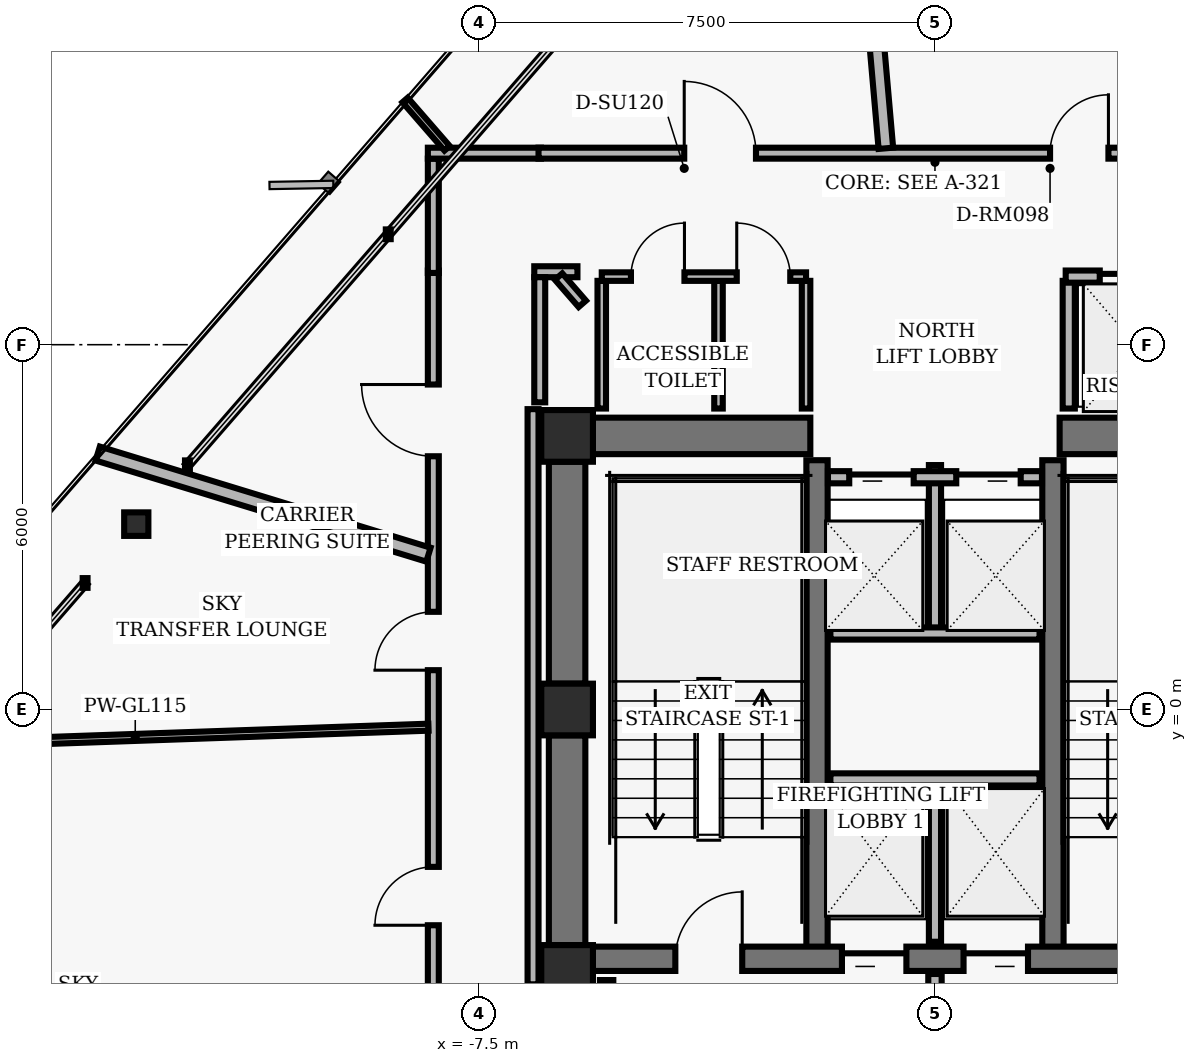
"""IFC4 building model, lengths in metres.
Left out: names, types, materials, properties, quantities, classifications, styles, units other than length and angle.
Written with IfcOpenShell. Run it as: python <this file> out.ifc"""

import sys

from ifc_helpers import new_model, si_unit, direction, frame, frame_2d, origin, origin_2d, place, context, subcontext, project, spatial, rectangle, hollow_rectangle, i_section, extrude, element, fill, save


model = new_model("IFC4")
c1 = context("Model", 3, precision=1e-05, world=origin(), true_north=direction((0.0, 1.0)))
c2 = subcontext(c1, "Body", "Model", "MODEL_VIEW")
j1 = project(units=[si_unit("LENGTHUNIT", "METRE"), si_unit("PLANEANGLEUNIT", "RADIAN")], contexts=[c1])
p1 = place(None, origin())
s1 = spatial("IfcSite", under=j1, at=p1, CompositionType="ELEMENT")
p2 = place(p1, origin())
s2 = spatial("IfcBuilding", under=s1, at=p2, CompositionType="ELEMENT")
p3 = place(p2, frame((0.0, 0.0, 168.48)))
s3 = spatial("IfcBuildingStorey", under=s2, at=p3, CompositionType="ELEMENT", Elevation=168.48)
for number, where, z_axis, x_axis in (
    (1, (-6.05, 4.5, 0.0), (0.0, 0.0, 1.0), (1.0, 0.0, 0.0)),
    (2, (-6.05, 0.0, 0.0), (0.0, 0.0, 1.0), (1.0, 0.0, 0.0)),
    (3, (-6.05, -4.3, 0.0), (0.0, 0.0, 1.0), (1.0, 0.0, 0.0)),
):
    element("IfcColumn", number, at=place(p3, frame(where, z_axis=z_axis, x_axis=x_axis)), inside=s3, PredefinedType="COLUMN", context=c2, shape_type="SweptSolid", body=[
        extrude(hollow_rectangle(XDim=0.85, YDim=0.85, WallThickness=0.055, InnerFilletRadius=0.02, OuterFilletRadius=0.04, at=origin_2d()), origin(), (0.0, 0.0, 1.0), 3.04),
    ])
p4 = place(p3, frame((-6.05, 0.425, 0.0), z_axis=(0.0, 0.0, 1.0), x_axis=(0.0, 1.0, 0.0)))
e4 = element("IfcWall", 4, at=p4, inside=s3, PredefinedType="SHEAR", context=c2, shape_type="SweptSolid", body=[
    extrude(rectangle(XDim=3.65, YDim=0.6, at=frame_2d((1.825, 0.0))), origin(), (0.0, 0.0, 1.0), 2.718),
])
p5 = place(p3, frame((-6.05, -3.875, 0.0), z_axis=(0.0, 0.0, 1.0), x_axis=(0.0, 1.0, 0.0)))
e5 = element("IfcWall", 5, at=p5, inside=s3, PredefinedType="SHEAR", context=c2, shape_type="SweptSolid", body=[
    extrude(rectangle(XDim=3.45, YDim=0.6, at=frame_2d((1.725, 0.0))), origin(), (0.0, 0.0, 1.0), 2.718),
])
for number, where, z_axis, x_axis in (
    (6, (-1.94, -4.1, 0.0), (0.0, 0.0, 1.0), (0.0, 1.0, 0.0)),
    (7, (1.94, -4.1, 0.0), (0.0, 0.0, 1.0), (0.0, 1.0, 0.0)),
):
    element("IfcWall", number, at=place(p3, frame(where, z_axis=z_axis, x_axis=x_axis)), inside=s3, PredefinedType="SHEAR", context=c2, shape_type="SweptSolid", body=[
        extrude(rectangle(XDim=8.2, YDim=0.35, at=frame_2d((4.1, 0.0))), origin(), (0.0, 0.0, 1.0), 2.718),
    ])
p6 = place(p3, frame((-5.625, -4.1, 0.0), z_axis=(0.0, 0.0, 1.0), x_axis=(1.0, 0.0, 0.0)))
e8 = element("IfcWall", 8, at=p6, inside=s3, PredefinedType="SHEAR", context=c2, shape_type="SweptSolid", body=[
    extrude(rectangle(XDim=11.25, YDim=0.4, at=frame_2d((5.625, 0.0))), origin(), (0.0, 0.0, 1.0), 2.718),
])
p7 = place(p6, frame((1.355, 0.0, 0.0)))
e9 = element("IfcOpeningElement", 9, at=p7, cuts=e8, PredefinedType="OPENING", context=c2, shape_type="SweptSolid", body=[
    extrude(rectangle(XDim=1.1, YDim=2.04, at=frame_2d((0.55, 1.02))), frame((0.0, 0.21, 0.0), z_axis=(0.0, -1.0, 0.0), x_axis=(1.0, 0.0, 0.0)), (0.0, 0.0, 1.0), 0.42),
])
p8 = place(p6, frame((8.795, 0.0, 0.0)))
e10 = element("IfcOpeningElement", 10, at=p8, cuts=e8, PredefinedType="OPENING", context=c2, shape_type="SweptSolid", body=[
    extrude(rectangle(XDim=1.1, YDim=2.04, at=frame_2d((0.55, 1.02))), frame((0.0, 0.21, 0.0), z_axis=(0.0, -1.0, 0.0), x_axis=(1.0, 0.0, 0.0)), (0.0, 0.0, 1.0), 0.42),
])
p9 = place(p6, frame((4.095, 0.0, 0.0)))
e11 = element("IfcOpeningElement", 11, at=p9, cuts=e8, PredefinedType="OPENING", context=c2, shape_type="SweptSolid", body=[
    extrude(rectangle(XDim=1.06, YDim=2.04, at=frame_2d((0.53, 1.02))), frame((0.0, 0.21, 0.0), z_axis=(0.0, -1.0, 0.0), x_axis=(1.0, 0.0, 0.0)), (0.0, 0.0, 1.0), 0.42),
])
p10 = place(p6, frame((6.095, 0.0, 0.0)))
e12 = element("IfcOpeningElement", 12, at=p10, cuts=e8, PredefinedType="OPENING", context=c2, shape_type="SweptSolid", body=[
    extrude(rectangle(XDim=1.06, YDim=2.04, at=frame_2d((0.53, 1.02))), frame((0.0, 0.21, 0.0), z_axis=(0.0, -1.0, 0.0), x_axis=(1.0, 0.0, 0.0)), (0.0, 0.0, 1.0), 0.42),
])
for number, where, z_axis, x_axis in (
    (13, (-5.625, 4.5, 0.0), (0.0, 0.0, 1.0), (1.0, 0.0, 0.0)),
    (14, (2.05, 4.5, 0.0), (0.0, 0.0, 1.0), (1.0, 0.0, 0.0)),
):
    element("IfcWall", number, at=place(p3, frame(where, z_axis=z_axis, x_axis=x_axis)), inside=s3, PredefinedType="SHEAR", context=c2, shape_type="SweptSolid", body=[
        extrude(rectangle(XDim=3.575, YDim=0.6, at=frame_2d((1.788, 0.0))), origin(), (0.0, 0.0, 1.0), 2.718),
    ])
p11 = place(p3, frame((-13.135, 3.049, 0.0), z_axis=(0.0, 0.0, 1.0), x_axis=(1.0, 0.0, 0.0)))
e15 = element("IfcColumn", 15, at=p11, inside=s3, PredefinedType="COLUMN", context=c2, shape_type="SweptSolid", body=[
    extrude(i_section(OverallWidth=0.398, OverallDepth=0.387, WebThickness=0.021, FlangeThickness=0.033, FilletRadius=0.018, at=origin_2d()), origin(), (0.0, 0.0, 1.0), 3.04),
])
p12 = place(p3, frame((0.0, -3.82, 0.0), z_axis=(0.0, 0.0, 1.0), x_axis=(0.0, 1.0, 0.0)))
e16 = element("IfcWall", 16, at=p12, inside=s3, PredefinedType="PARTITIONING", context=c2, shape_type="SweptSolid", body=[
    extrude(rectangle(XDim=2.67, YDim=0.2, at=frame_2d((1.335, 0.0))), origin(), (0.0, 0.0, 1.0), 2.693),
])
p13 = place(p3, frame((-1.72, -1.15, 0.0), z_axis=(0.0, 0.0, 1.0), x_axis=(1.0, 0.0, 0.0)))
e17 = element("IfcWall", 17, at=p13, inside=s3, PredefinedType="PARTITIONING", context=c2, shape_type="SweptSolid", body=[
    extrude(rectangle(XDim=3.44, YDim=0.2, at=frame_2d((1.72, 0.0))), origin(), (0.0, 0.0, 1.0), 2.693),
])
p14 = place(p3, frame((-5.4, -7.16, 0.0), z_axis=(0.0, 0.0, 1.0), x_axis=(0.0, 1.0, 0.0)))
e18 = element("IfcWall", 18, at=p14, inside=s3, PredefinedType="PARTITIONING", context=c2, shape_type="SweptSolid", body=[
    extrude(rectangle(XDim=2.71, YDim=0.22, at=frame_2d((1.355, 0.0))), origin(), (0.0, 0.0, 1.0), 2.693),
])
p15 = place(p3, frame((0.0, -7.16, 0.0), z_axis=(0.0, 0.0, 1.0), x_axis=(0.0, 1.0, 0.0)))
e19 = element("IfcWall", 19, at=p15, inside=s3, PredefinedType="PARTITIONING", context=c2, shape_type="SweptSolid", body=[
    extrude(rectangle(XDim=2.81, YDim=0.22, at=frame_2d((1.405, 0.0))), origin(), (0.0, 0.0, 1.0), 2.693),
])
p16 = place(p3, frame((0.0, 1.25, 0.0), z_axis=(0.0, 0.0, 1.0), x_axis=(0.0, 1.0, 0.0)))
e20 = element("IfcWall", 20, at=p16, inside=s3, PredefinedType="PARTITIONING", context=c2, shape_type="SweptSolid", body=[
    extrude(rectangle(XDim=2.77, YDim=0.2, at=frame_2d((1.385, 0.0))), origin(), (0.0, 0.0, 1.0), 2.693),
])
p17 = place(p3, frame((-1.72, 1.25, 0.0), z_axis=(0.0, 0.0, 1.0), x_axis=(1.0, 0.0, 0.0)))
e21 = element("IfcWall", 21, at=p17, inside=s3, PredefinedType="PARTITIONING", context=c2, shape_type="SweptSolid", body=[
    extrude(rectangle(XDim=3.44, YDim=0.2, at=frame_2d((1.72, 0.0))), origin(), (0.0, 0.0, 1.0), 2.693),
])
p18 = place(p3, frame((-1.76, 3.82, 0.0), z_axis=(0.0, 0.0, 1.0), x_axis=(1.0, 0.0, 0.0)))
e22 = element("IfcWall", 22, at=p18, inside=s3, PredefinedType="PARTITIONING", context=c2, shape_type="SweptSolid", body=[
    extrude(rectangle(XDim=3.52, YDim=0.2, at=frame_2d((1.76, 0.0))), origin(), (0.0, 0.0, 1.0), 2.693),
])
p19 = place(p18, frame((0.35, 0.0, 0.0)))
e23 = element("IfcOpeningElement", 23, at=p19, cuts=e22, PredefinedType="OPENING", context=c2, shape_type="SweptSolid", body=[
    extrude(rectangle(XDim=1.06, YDim=2.04, at=frame_2d((0.53, 1.02))), frame((0.0, 0.11, 0.0), z_axis=(0.0, -1.0, 0.0), x_axis=(1.0, 0.0, 0.0)), (0.0, 0.0, 1.0), 0.22),
])
p20 = place(p18, frame((2.11, 0.0, 0.0)))
e24 = element("IfcOpeningElement", 24, at=p20, cuts=e22, PredefinedType="OPENING", context=c2, shape_type="SweptSolid", body=[
    extrude(rectangle(XDim=1.06, YDim=2.04, at=frame_2d((0.53, 1.02))), frame((0.0, 0.11, 0.0), z_axis=(0.0, -1.0, 0.0), x_axis=(1.0, 0.0, 0.0)), (0.0, 0.0, 1.0), 0.22),
])
p21 = place(p3, frame((2.2, 4.95, 0.0), z_axis=(0.0, 0.0, 1.0), x_axis=(0.0, 1.0, 0.0)))
e25 = element("IfcWall", 25, at=p21, inside=s3, PredefinedType="PARTITIONING", context=c2, shape_type="SweptSolid", body=[
    extrude(rectangle(XDim=2.1, YDim=0.2, at=frame_2d((1.05, 0.0))), origin(), (0.0, 0.0, 1.0), 2.693),
])
p22 = place(p3, frame((2.15, 7.12, 0.0), z_axis=(0.0, 0.0, 1.0), x_axis=(1.0, 0.0, 0.0)))
e26 = element("IfcWall", 26, at=p22, inside=s3, PredefinedType="PARTITIONING", context=c2, shape_type="SweptSolid", body=[
    extrude(rectangle(XDim=2.38, YDim=0.2, at=frame_2d((1.19, 0.0))), origin(), (0.0, 0.0, 1.0), 2.693),
])
p23 = place(p22, frame((0.56, 0.0, 0.0)))
e27 = element("IfcOpeningElement", 27, at=p23, cuts=e26, PredefinedType="OPENING", context=c2, shape_type="SweptSolid", body=[
    extrude(rectangle(XDim=1.26, YDim=2.06, at=frame_2d((0.63, 1.03))), frame((0.0, 0.11, 0.0), z_axis=(0.0, -1.0, 0.0), x_axis=(1.0, 0.0, 0.0)), (0.0, 0.0, 1.0), 0.22),
])
for number, where, z_axis, x_axis in (
    (28, (-5.48, 4.95, 0.0), (0.0, 0.0, 1.0), (0.0, 1.0, 0.0)),
    (29, (-3.56, 4.95, 0.0), (0.0, 0.0, 1.0), (0.0, 1.0, 0.0)),
    (30, (-2.12, 4.95, 0.0), (0.0, 0.0, 1.0), (0.0, 1.0, 0.0)),
):
    element("IfcWall", number, at=place(p3, frame(where, z_axis=z_axis, x_axis=x_axis)), inside=s3, PredefinedType="PARTITIONING", context=c2, shape_type="SweptSolid", body=[
        extrude(rectangle(XDim=2.1, YDim=0.14, at=frame_2d((1.05, 0.0))), origin(), (0.0, 0.0, 1.0), 2.693),
    ])
p24 = place(p3, frame((-5.48, 7.12, 0.0), z_axis=(0.0, 0.0, 1.0), x_axis=(1.0, 0.0, 0.0)))
e31 = element("IfcWall", 31, at=p24, inside=s3, PredefinedType="PARTITIONING", context=c2, shape_type="SweptSolid", body=[
    extrude(rectangle(XDim=3.36, YDim=0.14, at=frame_2d((1.68, 0.0))), origin(), (0.0, 0.0, 1.0), 2.693),
])
p25 = place(p24, frame((0.48, 0.0, 0.0)))
e32 = element("IfcOpeningElement", 32, at=p25, cuts=e31, PredefinedType="OPENING", context=c2, shape_type="SweptSolid", body=[
    extrude(rectangle(XDim=0.88, YDim=2.02, at=frame_2d((0.44, 1.01))), frame((0.0, 0.08, 0.0), z_axis=(0.0, -1.0, 0.0), x_axis=(1.0, 0.0, 0.0)), (0.0, 0.0, 1.0), 0.16),
])
p26 = place(p24, frame((2.22, 0.0, 0.0)))
e33 = element("IfcOpeningElement", 33, at=p26, cuts=e31, PredefinedType="OPENING", context=c2, shape_type="SweptSolid", body=[
    extrude(rectangle(XDim=0.88, YDim=2.02, at=frame_2d((0.44, 1.01))), frame((0.0, 0.08, 0.0), z_axis=(0.0, -1.0, 0.0), x_axis=(1.0, 0.0, 0.0)), (0.0, 0.0, 1.0), 0.16),
])
p27 = place(p3, frame((-8.25, -7.22, 0.0), z_axis=(0.0, 0.0, 1.0), x_axis=(0.0, 1.0, 0.0)))
e34 = element("IfcWall", 34, at=p27, inside=s3, PredefinedType="PARTITIONING", context=c2, shape_type="SweptSolid", body=[
    extrude(rectangle(XDim=14.44, YDim=0.18, at=frame_2d((7.22, 0.0))), origin(), (0.0, 0.0, 1.0), 2.693),
])
p28 = place(p27, frame((3.671, 0.0, 0.0)))
e35 = element("IfcOpeningElement", 35, at=p28, cuts=e34, PredefinedType="OPENING", context=c2, shape_type="SweptSolid", body=[
    extrude(rectangle(XDim=0.96, YDim=2.02, at=frame_2d((0.48, 1.01))), frame((0.0, 0.1, 0.0), z_axis=(0.0, -1.0, 0.0), x_axis=(1.0, 0.0, 0.0)), (0.0, 0.0, 1.0), 0.2),
])
p29 = place(p27, frame((11.385, 0.0, 0.0)))
e36 = element("IfcOpeningElement", 36, at=p29, cuts=e34, PredefinedType="OPENING", context=c2, shape_type="SweptSolid", body=[
    extrude(rectangle(XDim=1.18, YDim=2.02, at=frame_2d((0.59, 1.01))), frame((0.0, 0.1, 0.0), z_axis=(0.0, -1.0, 0.0), x_axis=(1.0, 0.0, 0.0)), (0.0, 0.0, 1.0), 0.2),
])
p30 = place(p27, frame((7.867, 0.0, 0.0)))
e37 = element("IfcOpeningElement", 37, at=p30, cuts=e34, PredefinedType="OPENING", context=c2, shape_type="SweptSolid", body=[
    extrude(rectangle(XDim=0.96, YDim=2.02, at=frame_2d((0.48, 1.01))), frame((0.0, 0.1, 0.0), z_axis=(0.0, -1.0, 0.0), x_axis=(1.0, 0.0, 0.0)), (0.0, 0.0, 1.0), 0.2),
])
p31 = place(p3, frame((-8.25, 7.18, 0.0), z_axis=(0.0, 0.0, 1.0), x_axis=(0.0, 1.0, 0.0)))
e38 = element("IfcWall", 38, at=p31, inside=s3, PredefinedType="PARTITIONING", context=c2, shape_type="SweptSolid", body=[
    extrude(rectangle(XDim=1.88, YDim=0.18, at=frame_2d((0.94, 0.0))), origin(), (0.0, 0.0, 1.0), 2.693),
])
p32 = place(p3, frame((-8.34, 9.15, 0.0), z_axis=(0.0, 0.0, 1.0), x_axis=(1.0, 0.0, 0.0)))
e39 = element("IfcWall", 39, at=p32, inside=s3, PredefinedType="PARTITIONING", context=c2, shape_type="SweptSolid", body=[
    extrude(rectangle(XDim=1.86, YDim=0.18, at=frame_2d((0.93, 0.0))), origin(), (0.0, 0.0, 1.0), 2.693),
])
p33 = place(p3, frame((-6.52, 9.15, 0.0), z_axis=(0.0, 0.0, 1.0), x_axis=(1.0, 0.0, 0.0)))
e40 = element("IfcWall", 40, at=p33, inside=s3, PredefinedType="PARTITIONING", context=c2, shape_type="SweptSolid", body=[
    extrude(rectangle(XDim=16.662, YDim=0.18, at=frame_2d((8.331, 0.0))), origin(), (0.0, 0.0, 1.0), 2.693),
])
p34 = place(p33, frame((13.65, 0.0, 0.0)))
e41 = element("IfcOpeningElement", 41, at=p34, cuts=e40, PredefinedType="OPENING", context=c2, shape_type="SweptSolid", body=[
    extrude(rectangle(XDim=1.18, YDim=2.02, at=frame_2d((0.59, 1.01))), frame((0.0, 0.1, 0.0), z_axis=(0.0, -1.0, 0.0), x_axis=(1.0, 0.0, 0.0)), (0.0, 0.0, 1.0), 0.2),
])
p35 = place(p33, frame((8.413, 0.0, 0.0)))
e42 = element("IfcOpeningElement", 42, at=p35, cuts=e40, PredefinedType="OPENING", context=c2, shape_type="SweptSolid", body=[
    extrude(rectangle(XDim=0.96, YDim=2.02, at=frame_2d((0.48, 1.01))), frame((0.0, 0.1, 0.0), z_axis=(0.0, -1.0, 0.0), x_axis=(1.0, 0.0, 0.0)), (0.0, 0.0, 1.0), 0.2),
])
p36 = place(p33, frame((2.396, 0.0, 0.0)))
e43 = element("IfcOpeningElement", 43, at=p36, cuts=e40, PredefinedType="OPENING", context=c2, shape_type="SweptSolid", body=[
    extrude(rectangle(XDim=1.18, YDim=2.02, at=frame_2d((0.59, 1.01))), frame((0.0, 0.1, 0.0), z_axis=(0.0, -1.0, 0.0), x_axis=(1.0, 0.0, 0.0)), (0.0, 0.0, 1.0), 0.2),
])
p37 = place(p3, frame((-5.88, 7.2, 0.0), z_axis=(0.0, 0.0, 1.0), x_axis=(-1.0, 0.0, 0.0)))
e44 = element("IfcWall", 44, at=p37, inside=s3, PredefinedType="PARTITIONING", context=c2, shape_type="SweptSolid", body=[
    extrude(rectangle(XDim=0.71, YDim=0.18, at=frame_2d((0.355, 0.0))), origin(), (0.0, 0.0, 1.0), 2.693),
])
p38 = place(p3, frame((-6.5, 7.11, 0.0), z_axis=(0.0, 0.0, 1.0), x_axis=(0.0, -1.0, 0.0)))
e45 = element("IfcWall", 45, at=p38, inside=s3, PredefinedType="PARTITIONING", context=c2, shape_type="SweptSolid", body=[
    extrude(rectangle(XDim=2.058, YDim=0.18, at=frame_2d((1.029, 0.0))), origin(), (0.0, 0.0, 1.0), 2.693),
])
p39 = place(p3, frame((-6.61, 4.94, 0.0), z_axis=(0.0, 0.0, 1.0), x_axis=(0.0, -1.0, 0.0)))
e46 = element("IfcWall", 46, at=p39, inside=s3, PredefinedType="PARTITIONING", context=c2, shape_type="SweptSolid", body=[
    extrude(rectangle(XDim=9.46, YDim=0.18, at=frame_2d((4.73, 0.0))), origin(), (0.0, 0.0, 1.0), 2.693),
])
p40 = place(p3, frame((-8.33, -0.291, 0.0), z_axis=(0.0, 0.0, 1.0), x_axis=(-0.99939124622, -0.03488749028, 0.0)))
e47 = element("IfcWall", 47, at=p40, inside=s3, PredefinedType="MOVABLE", context=c2, shape_type="SweptSolid", body=[
    extrude(rectangle(XDim=9.65, YDim=0.115, at=frame_2d((4.825, 0.0))), origin(), (0.0, 0.0, 1.0), 2.693),
])
p41 = place(p3, frame((-0.808, 9.23, 0.0), z_axis=(0.0, 0.0, 1.0), x_axis=(-0.087150498686, 0.996195156874, 0.0)))
e48 = element("IfcWall", 48, at=p41, inside=s3, PredefinedType="PARTITIONING", context=c2, shape_type="SweptSolid", body=[
    extrude(rectangle(XDim=9.021, YDim=0.24, at=frame_2d((4.51, 0.0))), origin(), (0.0, 0.0, 1.0), 2.693),
])
p42 = place(p3, frame((-5.8, 6.672, 0.0), z_axis=(0.0, 0.0, 1.0), x_axis=(-0.655791573116, 0.754941992891, 0.0)))
e49 = element("IfcWall", 49, at=p42, inside=s3, PredefinedType="PARTITIONING", context=c2, shape_type="SweptSolid", body=[
    extrude(rectangle(XDim=0.594, YDim=0.16, at=frame_2d((0.297, 0.0))), origin(), (0.0, 0.0, 1.0), 2.693),
])
p43 = place(p3, frame((-8.023, 9.23, 0.0), z_axis=(0.0, 0.0, 1.0), x_axis=(-0.656121313299, 0.754655432787, 0.0)))
e50 = element("IfcWall", 50, at=p43, inside=s3, PredefinedType="MOVABLE", context=c2, shape_type="SweptSolid", body=[
    extrude(rectangle(XDim=1.053, YDim=0.115, at=frame_2d((0.526, 0.0))), origin(), (0.0, 0.0, 1.0), 2.693),
])
p44 = place(p3, frame((-8.33, 2.547, 0.0), z_axis=(0.0, 0.0, 1.0), x_axis=(-0.95629724105, 0.292396283766, 0.0)))
e51 = element("IfcWall", 51, at=p44, inside=s3, PredefinedType="PARTITIONING", context=c2, shape_type="SweptSolid", body=[
    extrude(rectangle(XDim=5.688, YDim=0.24, at=frame_2d((2.844, 0.0))), origin(), (0.0, 0.0, 1.0), 2.693),
])
p45 = place(p7, origin())
e52 = element("IfcDoor", 52, at=p45, inside=s3, OperationType="SINGLE_SWING_RIGHT", PredefinedType="DOOR", context=c2, shape_type="SweptSolid", body=[
    extrude(rectangle(XDim=1.1, YDim=2.04, at=frame_2d((0.55, 1.02))), frame((0.0, 0.025, 0.0), z_axis=(0.0, -1.0, 0.0), x_axis=(1.0, 0.0, 0.0)), (0.0, 0.0, 1.0), 0.05),
])
fill(e9, e52)
p46 = place(p9, origin())
e53 = element("IfcDoor", 53, at=p46, inside=s3, OperationType="SLIDING_TO_LEFT", PredefinedType="DOOR", context=c2, shape_type="SweptSolid", body=[
    extrude(rectangle(XDim=1.06, YDim=2.04, at=frame_2d((0.53, 1.02))), frame((0.0, 0.025, 0.0), z_axis=(0.0, -1.0, 0.0), x_axis=(1.0, 0.0, 0.0)), (0.0, 0.0, 1.0), 0.05),
])
fill(e11, e53)
p47 = place(p10, origin())
e54 = element("IfcDoor", 54, at=p47, inside=s3, OperationType="SLIDING_TO_RIGHT", PredefinedType="DOOR", context=c2, shape_type="SweptSolid", body=[
    extrude(rectangle(XDim=1.06, YDim=2.04, at=frame_2d((0.53, 1.02))), frame((0.0, 0.025, 0.0), z_axis=(0.0, -1.0, 0.0), x_axis=(1.0, 0.0, 0.0)), (0.0, 0.0, 1.0), 0.05),
])
fill(e12, e54)
p48 = place(p19, origin())
e55 = element("IfcDoor", 55, at=p48, inside=s3, OperationType="SLIDING_TO_LEFT", PredefinedType="DOOR", context=c2, shape_type="SweptSolid", body=[
    extrude(rectangle(XDim=1.06, YDim=2.04, at=frame_2d((0.53, 1.02))), frame((0.0, 0.025, 0.0), z_axis=(0.0, -1.0, 0.0), x_axis=(1.0, 0.0, 0.0)), (0.0, 0.0, 1.0), 0.05),
])
fill(e23, e55)
p49 = place(p20, origin())
e56 = element("IfcDoor", 56, at=p49, inside=s3, OperationType="SLIDING_TO_RIGHT", PredefinedType="DOOR", context=c2, shape_type="SweptSolid", body=[
    extrude(rectangle(XDim=1.06, YDim=2.04, at=frame_2d((0.53, 1.02))), frame((0.0, 0.025, 0.0), z_axis=(0.0, -1.0, 0.0), x_axis=(1.0, 0.0, 0.0)), (0.0, 0.0, 1.0), 0.05),
])
fill(e24, e56)
p50 = place(p23, origin())
e57 = element("IfcDoor", 57, at=p50, inside=s3, OperationType="SLIDING_TO_LEFT", PredefinedType="DOOR", context=c2, shape_type="SweptSolid", body=[
    extrude(rectangle(XDim=1.26, YDim=2.06, at=frame_2d((0.63, 1.03))), frame((0.0, 0.025, 0.0), z_axis=(0.0, -1.0, 0.0), x_axis=(1.0, 0.0, 0.0)), (0.0, 0.0, 1.0), 0.05),
])
fill(e27, e57)
p51 = place(p25, origin())
e58 = element("IfcDoor", 58, at=p51, inside=s3, OperationType="SINGLE_SWING_RIGHT", PredefinedType="DOOR", context=c2, shape_type="SweptSolid", body=[
    extrude(rectangle(XDim=0.88, YDim=2.02, at=frame_2d((0.44, 1.01))), frame((0.0, 0.025, 0.0), z_axis=(0.0, -1.0, 0.0), x_axis=(1.0, 0.0, 0.0)), (0.0, 0.0, 1.0), 0.05),
])
fill(e32, e58)
p52 = place(p26, origin())
e59 = element("IfcDoor", 59, at=p52, inside=s3, OperationType="SINGLE_SWING_LEFT", PredefinedType="DOOR", context=c2, shape_type="SweptSolid", body=[
    extrude(rectangle(XDim=0.88, YDim=2.02, at=frame_2d((0.44, 1.01))), frame((0.0, 0.025, 0.0), z_axis=(0.0, -1.0, 0.0), x_axis=(1.0, 0.0, 0.0)), (0.0, 0.0, 1.0), 0.05),
])
fill(e33, e59)
p53 = place(p28, origin())
e60 = element("IfcDoor", 60, at=p53, inside=s3, OperationType="SINGLE_SWING_LEFT", PredefinedType="DOOR", context=c2, shape_type="SweptSolid", body=[
    extrude(rectangle(XDim=0.96, YDim=2.02, at=frame_2d((0.48, 1.01))), frame((0.0, 0.025, 0.0), z_axis=(0.0, -1.0, 0.0), x_axis=(1.0, 0.0, 0.0)), (0.0, 0.0, 1.0), 0.05),
])
fill(e35, e60)
p54 = place(p35, origin())
e61 = element("IfcDoor", 61, at=p54, inside=s3, OperationType="SINGLE_SWING_RIGHT", PredefinedType="DOOR", context=c2, shape_type="SweptSolid", body=[
    extrude(rectangle(XDim=0.96, YDim=2.02, at=frame_2d((0.48, 1.01))), frame((0.0, 0.025, 0.0), z_axis=(0.0, -1.0, 0.0), x_axis=(1.0, 0.0, 0.0)), (0.0, 0.0, 1.0), 0.05),
])
fill(e42, e61)
p55 = place(p36, origin())
e62 = element("IfcDoor", 62, at=p55, inside=s3, OperationType="SINGLE_SWING_LEFT", PredefinedType="DOOR", context=c2, shape_type="SweptSolid", body=[
    extrude(rectangle(XDim=1.18, YDim=2.02, at=frame_2d((0.59, 1.01))), frame((0.0, 0.025, 0.0), z_axis=(0.0, -1.0, 0.0), x_axis=(1.0, 0.0, 0.0)), (0.0, 0.0, 1.0), 0.05),
])
fill(e43, e62)
p56 = place(p29, origin())
e63 = element("IfcDoor", 63, at=p56, inside=s3, OperationType="SINGLE_SWING_RIGHT", PredefinedType="DOOR", context=c2, shape_type="SweptSolid", body=[
    extrude(rectangle(XDim=1.18, YDim=2.02, at=frame_2d((0.59, 1.01))), frame((0.0, 0.025, 0.0), z_axis=(0.0, -1.0, 0.0), x_axis=(1.0, 0.0, 0.0)), (0.0, 0.0, 1.0), 0.05),
])
fill(e36, e63)
p57 = place(p30, origin())
e64 = element("IfcDoor", 64, at=p57, inside=s3, OperationType="SINGLE_SWING_LEFT", PredefinedType="DOOR", context=c2, shape_type="SweptSolid", body=[
    extrude(rectangle(XDim=0.96, YDim=2.02, at=frame_2d((0.48, 1.01))), frame((0.0, 0.025, 0.0), z_axis=(0.0, -1.0, 0.0), x_axis=(1.0, 0.0, 0.0)), (0.0, 0.0, 1.0), 0.05),
])
fill(e37, e64)
save(model, sys.argv[1])
